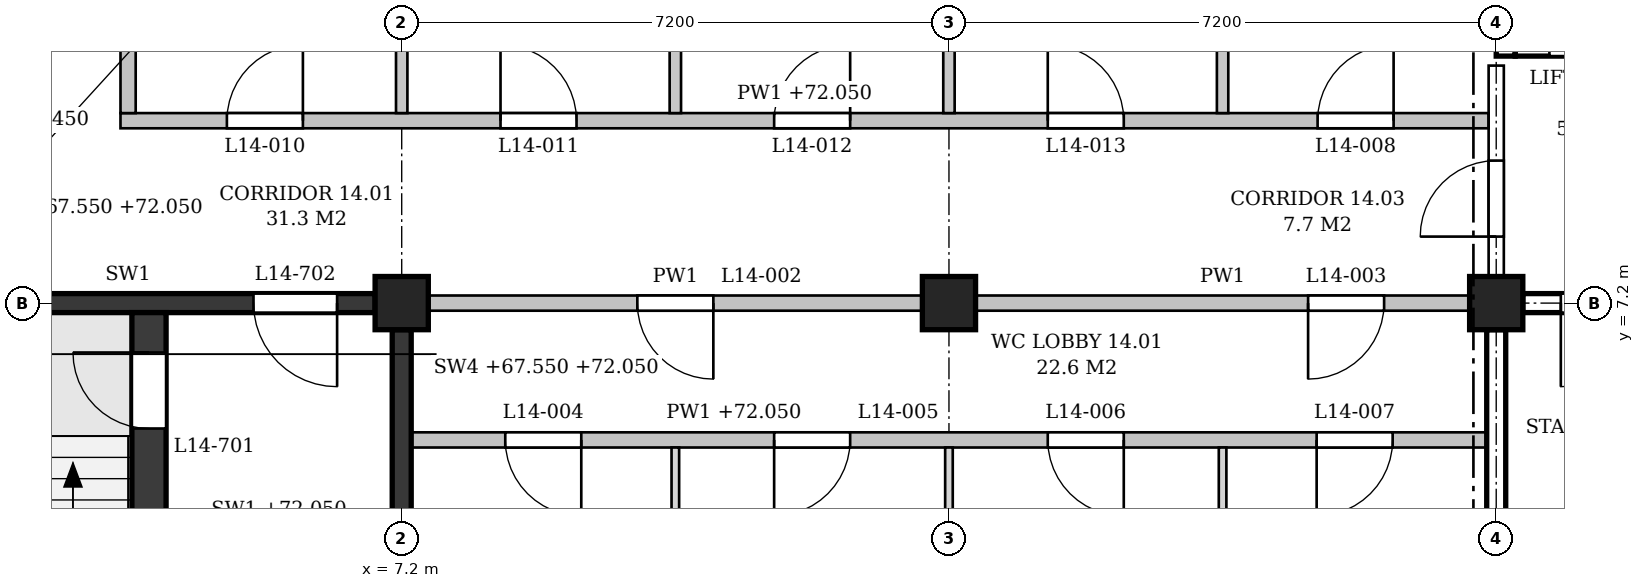
"""IFC4 building model, lengths in metres.
Left out: names, types, materials, properties, quantities, classifications, styles, units other than length and angle.
Written with IfcOpenShell. Run it as: python <this file> out.ifc"""

import sys

from ifc_helpers import new_model, si_unit, direction, frame, frame_2d, origin, origin_2d, place, context, subcontext, project, spatial, polyline, rectangle, outline, extrude, element, fill, save


model = new_model("IFC4")
c1 = context("Model", 3, precision=1e-05, world=origin(), true_north=direction((0.0, 1.0)))
c2 = subcontext(c1, "Body", "Model", "MODEL_VIEW")
j1 = project(units=[si_unit("LENGTHUNIT", "METRE"), si_unit("PLANEANGLEUNIT", "RADIAN")], contexts=[c1])
p1 = place(None, origin())
s1 = spatial("IfcSite", under=j1, at=p1, CompositionType="ELEMENT")
p2 = place(p1, origin())
s2 = spatial("IfcBuilding", under=s1, at=p2, CompositionType="ELEMENT")
p3 = place(p2, frame((0.0, 0.0, 67.8)))
s3 = spatial("IfcBuildingStorey", under=s2, at=p3, CompositionType="ELEMENT", Elevation=67.8)
for number, where, z_axis, x_axis in (
    (1, (7.2, 7.2, 0.0), (0.0, 0.0, 1.0), (1.0, 0.0, 0.0)),
    (2, (14.4, 7.2, 0.0), (0.0, 0.0, 1.0), (1.0, 0.0, 0.0)),
    (3, (21.6, 7.2, 0.0), (0.0, 0.0, 1.0), (1.0, 0.0, 0.0)),
):
    element("IfcColumn", number, at=place(p3, frame(where, z_axis=z_axis, x_axis=x_axis)), inside=s3, PredefinedType="COLUMN", context=c2, shape_type="SweptSolid", body=[
        extrude(rectangle(XDim=0.7, YDim=0.7, at=origin_2d()), origin(), (0.0, 0.0, 1.0), 4.5),
    ])
p4 = place(p3, frame((0.35, 7.2, 0.0), z_axis=(0.0, 0.0, 1.0), x_axis=(1.0, 0.0, 0.0)))
e4 = element("IfcWall", 4, at=p4, inside=s3, PredefinedType="SHEAR", context=c2, shape_type="SweptSolid", body=[
    extrude(rectangle(XDim=6.5, YDim=0.25, at=frame_2d((3.25, 0.0))), origin(), (0.0, 0.0, 1.0), 3.6),
])
p5 = place(p4, frame((4.9, 0.0, 0.0)))
e5 = element("IfcOpeningElement", 5, at=p5, cuts=e4, PredefinedType="OPENING", context=c2, shape_type="SweptSolid", body=[
    extrude(rectangle(XDim=1.1, YDim=2.1, at=frame_2d((0.55, 1.05))), frame((0.0, 0.135, 0.0), z_axis=(0.0, -1.0, 0.0), x_axis=(1.0, 0.0, 0.0)), (0.0, 0.0, 1.0), 0.27),
])
p6 = place(p3, frame((7.2, 0.35, 0.0), z_axis=(0.0, 0.0, 1.0), x_axis=(0.0, 1.0, 0.0)))
e6 = element("IfcWall", 6, at=p6, inside=s3, PredefinedType="SHEAR", context=c2, shape_type="SweptSolid", body=[
    extrude(rectangle(XDim=6.5, YDim=0.25, at=frame_2d((3.25, 0.0))), origin(), (0.0, 0.0, 1.0), 3.6),
])
p7 = place(p3, frame((3.875, 0.15, 0.0), z_axis=(0.0, 0.0, 1.0), x_axis=(0.0, 1.0, 0.0)))
e7 = element("IfcWall", 7, at=p7, inside=s3, PredefinedType="SHEAR", context=c2, shape_type="SweptSolid", body=[
    extrude(rectangle(XDim=6.925, YDim=0.45, at=frame_2d((3.462, 0.0))), origin(), (0.0, 0.0, 1.0), 4.25),
])
p8 = place(p7, frame((5.4, 0.0, 0.0)))
e8 = element("IfcOpeningElement", 8, at=p8, cuts=e7, PredefinedType="OPENING", context=c2, shape_type="SweptSolid", body=[
    extrude(rectangle(XDim=1.0, YDim=2.1, at=frame_2d((0.5, 1.05))), frame((0.0, 0.235, 0.0), z_axis=(0.0, -1.0, 0.0), x_axis=(1.0, 0.0, 0.0)), (0.0, 0.0, 1.0), 0.47),
])
p9 = place(p3, frame((21.95, 7.2, 0.0), z_axis=(0.0, 0.0, 1.0), x_axis=(1.0, 0.0, 0.0)))
e9 = element("IfcWall", 9, at=p9, inside=s3, PredefinedType="SHEAR", context=c2, shape_type="SweptSolid", body=[
    extrude(rectangle(XDim=6.5, YDim=0.25, at=frame_2d((3.25, 0.0))), origin(), (0.0, 0.0, 1.0), 3.6),
])
p10 = place(p9, frame((0.5, 0.0, 0.0)))
e10 = element("IfcOpeningElement", 10, at=p10, cuts=e9, PredefinedType="OPENING", context=c2, shape_type="SweptSolid", body=[
    extrude(rectangle(XDim=1.1, YDim=2.1, at=frame_2d((0.55, 1.05))), frame((0.0, 0.135, 0.0), z_axis=(0.0, -1.0, 0.0), x_axis=(1.0, 0.0, 0.0)), (0.0, 0.0, 1.0), 0.27),
])
p11 = place(p3, frame((21.6, 0.35, 0.0), z_axis=(0.0, 0.0, 1.0), x_axis=(0.0, 1.0, 0.0)))
e11 = element("IfcWall", 11, at=p11, inside=s3, PredefinedType="SHEAR", context=c2, shape_type="SweptSolid", body=[
    extrude(rectangle(XDim=6.5, YDim=0.25, at=frame_2d((3.25, 0.0))), origin(), (0.0, 0.0, 1.0), 3.6),
])
p12 = place(p3, frame((21.725, 10.45, -0.25), z_axis=(0.0, 0.0, 1.0), x_axis=(0.0, 1.0, 0.0)))
e12 = element("IfcWall", 12, at=p12, inside=s3, PredefinedType="SHEAR", context=c2, shape_type="SweptSolid", body=[
    extrude(rectangle(XDim=3.6, YDim=0.25, at=frame_2d((1.8, 0.0))), origin(), (0.0, 0.0, 1.0), 3.85),
])
p13 = place(p3, frame((21.85, 10.575, -0.25), z_axis=(0.0, 0.0, 1.0), x_axis=(1.0, 0.0, 0.0)))
e13 = element("IfcWall", 13, at=p13, inside=s3, PredefinedType="SHEAR", context=c2, shape_type="SweptSolid", body=[
    extrude(rectangle(XDim=2.0, YDim=0.25, at=frame_2d((1.0, 0.0))), origin(), (0.0, 0.0, 1.0), 4.5),
])
p14 = place(p13, frame((0.45, 0.0, 0.25)))
e14 = element("IfcOpeningElement", 14, at=p14, cuts=e13, PredefinedType="OPENING", context=c2, shape_type="SweptSolid", body=[
    extrude(rectangle(XDim=1.1, YDim=2.1, at=frame_2d((0.55, 1.05))), frame((0.0, 0.135, 0.0), z_axis=(0.0, -1.0, 0.0), x_axis=(1.0, 0.0, 0.0)), (0.0, 0.0, 1.0), 0.27),
])
p15 = place(p3, frame((7.325, 5.4, 0.0), z_axis=(0.0, 0.0, 1.0), x_axis=(1.0, 0.0, 0.0)))
e15 = element("IfcWall", 15, at=p15, inside=s3, PredefinedType="PARTITIONING", context=c2, shape_type="SweptSolid", body=[
    extrude(outline(polyline([(0.0, 0.0), (14.15, 0.0), (14.15, 3.6), (14.075, 3.6), (14.075, 4.25), (7.275, 4.25), (7.275, 3.6), (6.875, 3.6), (6.875, 4.25), (0.075, 4.25), (0.075, 3.6), (0.0, 3.6), (0.0, 0.0)])), frame((0.0, 0.1, 0.0), z_axis=(0.0, -1.0, 0.0), x_axis=(1.0, 0.0, 0.0)), (0.0, 0.0, 1.0), 0.2),
])
p16 = place(p15, frame((1.238, 0.0, 0.0)))
e16 = element("IfcOpeningElement", 16, at=p16, cuts=e15, PredefinedType="OPENING", context=c2, shape_type="SweptSolid", body=[
    extrude(rectangle(XDim=1.0, YDim=2.1, at=frame_2d((0.5, 1.05))), frame((0.0, 0.11, 0.0), z_axis=(0.0, -1.0, 0.0), x_axis=(1.0, 0.0, 0.0)), (0.0, 0.0, 1.0), 0.22),
])
p17 = place(p15, frame((4.775, 0.0, 0.0)))
e17 = element("IfcOpeningElement", 17, at=p17, cuts=e15, PredefinedType="OPENING", context=c2, shape_type="SweptSolid", body=[
    extrude(rectangle(XDim=1.0, YDim=2.1, at=frame_2d((0.5, 1.05))), frame((0.0, 0.11, 0.0), z_axis=(0.0, -1.0, 0.0), x_axis=(1.0, 0.0, 0.0)), (0.0, 0.0, 1.0), 0.22),
])
p18 = place(p15, frame((8.375, 0.0, 0.0)))
e18 = element("IfcOpeningElement", 18, at=p18, cuts=e15, PredefinedType="OPENING", context=c2, shape_type="SweptSolid", body=[
    extrude(rectangle(XDim=1.0, YDim=2.1, at=frame_2d((0.5, 1.05))), frame((0.0, 0.11, 0.0), z_axis=(0.0, -1.0, 0.0), x_axis=(1.0, 0.0, 0.0)), (0.0, 0.0, 1.0), 0.22),
])
p19 = place(p15, frame((11.913, 0.0, 0.0)))
e19 = element("IfcOpeningElement", 19, at=p19, cuts=e15, PredefinedType="OPENING", context=c2, shape_type="SweptSolid", body=[
    extrude(rectangle(XDim=1.0, YDim=2.1, at=frame_2d((0.5, 1.05))), frame((0.0, 0.11, 0.0), z_axis=(0.0, -1.0, 0.0), x_axis=(1.0, 0.0, 0.0)), (0.0, 0.0, 1.0), 0.22),
])
p20 = place(p3, frame((7.55, 7.2, 0.0), z_axis=(0.0, 0.0, 1.0), x_axis=(1.0, 0.0, 0.0)))
e20 = element("IfcWall", 20, at=p20, inside=s3, PredefinedType="PARTITIONING", context=c2, shape_type="SweptSolid", body=[
    extrude(rectangle(XDim=6.5, YDim=0.2, at=frame_2d((3.25, 0.0))), origin(), (0.0, 0.0, 1.0), 3.6),
])
p21 = place(p20, frame((2.75, 0.0, 0.0)))
e21 = element("IfcOpeningElement", 21, at=p21, cuts=e20, PredefinedType="OPENING", context=c2, shape_type="SweptSolid", body=[
    extrude(rectangle(XDim=1.0, YDim=2.1, at=frame_2d((0.5, 1.05))), frame((0.0, 0.11, 0.0), z_axis=(0.0, -1.0, 0.0), x_axis=(1.0, 0.0, 0.0)), (0.0, 0.0, 1.0), 0.22),
])
p22 = place(p3, frame((14.75, 7.2, 0.0), z_axis=(0.0, 0.0, 1.0), x_axis=(1.0, 0.0, 0.0)))
e22 = element("IfcWall", 22, at=p22, inside=s3, PredefinedType="PARTITIONING", context=c2, shape_type="SweptSolid", body=[
    extrude(rectangle(XDim=6.5, YDim=0.2, at=frame_2d((3.25, 0.0))), origin(), (0.0, 0.0, 1.0), 3.6),
])
p23 = place(p22, frame((4.375, 0.0, 0.0)))
e23 = element("IfcOpeningElement", 23, at=p23, cuts=e22, PredefinedType="OPENING", context=c2, shape_type="SweptSolid", body=[
    extrude(rectangle(XDim=1.0, YDim=2.1, at=frame_2d((0.5, 1.05))), frame((0.0, 0.11, 0.0), z_axis=(0.0, -1.0, 0.0), x_axis=(1.0, 0.0, 0.0)), (0.0, 0.0, 1.0), 0.22),
])
p24 = place(p3, frame((3.5, 9.6, 0.0), z_axis=(0.0, 0.0, 1.0), x_axis=(1.0, 0.0, 0.0)))
e24 = element("IfcWall", 24, at=p24, inside=s3, PredefinedType="PARTITIONING", context=c2, shape_type="SweptSolid", body=[
    extrude(outline(polyline([(0.0, 0.0), (18.0, 0.0), (18.0, 3.6), (17.9, 3.6), (17.9, 4.25), (11.1, 4.25), (11.1, 3.6), (10.7, 3.6), (10.7, 4.25), (3.9, 4.25), (3.9, 3.6), (3.5, 3.6), (3.5, 4.25), (0.0, 4.25), (0.0, 0.0)])), frame((0.0, 0.1, 0.0), z_axis=(0.0, -1.0, 0.0), x_axis=(1.0, 0.0, 0.0)), (0.0, 0.0, 1.0), 0.2),
])
p25 = place(p24, frame((15.75, 0.0, 0.0)))
e25 = element("IfcOpeningElement", 25, at=p25, cuts=e24, PredefinedType="OPENING", context=c2, shape_type="SweptSolid", body=[
    extrude(rectangle(XDim=1.0, YDim=2.1, at=frame_2d((0.5, 1.05))), frame((0.0, 0.11, 0.0), z_axis=(0.0, -1.0, 0.0), x_axis=(1.0, 0.0, 0.0)), (0.0, 0.0, 1.0), 0.22),
])
p26 = place(p24, frame((1.4, 0.0, 0.0)))
e26 = element("IfcOpeningElement", 26, at=p26, cuts=e24, PredefinedType="OPENING", context=c2, shape_type="SweptSolid", body=[
    extrude(rectangle(XDim=1.0, YDim=2.1, at=frame_2d((0.5, 1.05))), frame((0.0, 0.11, 0.0), z_axis=(0.0, -1.0, 0.0), x_axis=(1.0, 0.0, 0.0)), (0.0, 0.0, 1.0), 0.22),
])
p27 = place(p24, frame((5.0, 0.0, 0.0)))
e27 = element("IfcOpeningElement", 27, at=p27, cuts=e24, PredefinedType="OPENING", context=c2, shape_type="SweptSolid", body=[
    extrude(rectangle(XDim=1.0, YDim=2.1, at=frame_2d((0.5, 1.05))), frame((0.0, 0.11, 0.0), z_axis=(0.0, -1.0, 0.0), x_axis=(1.0, 0.0, 0.0)), (0.0, 0.0, 1.0), 0.22),
])
p28 = place(p24, frame((8.6, 0.0, 0.0)))
e28 = element("IfcOpeningElement", 28, at=p28, cuts=e24, PredefinedType="OPENING", context=c2, shape_type="SweptSolid", body=[
    extrude(rectangle(XDim=1.0, YDim=2.1, at=frame_2d((0.5, 1.05))), frame((0.0, 0.11, 0.0), z_axis=(0.0, -1.0, 0.0), x_axis=(1.0, 0.0, 0.0)), (0.0, 0.0, 1.0), 0.22),
])
p29 = place(p24, frame((12.2, 0.0, 0.0)))
e29 = element("IfcOpeningElement", 29, at=p29, cuts=e24, PredefinedType="OPENING", context=c2, shape_type="SweptSolid", body=[
    extrude(rectangle(XDim=1.0, YDim=2.1, at=frame_2d((0.5, 1.05))), frame((0.0, 0.11, 0.0), z_axis=(0.0, -1.0, 0.0), x_axis=(1.0, 0.0, 0.0)), (0.0, 0.0, 1.0), 0.22),
])
p30 = place(p3, frame((3.6, 9.7, 0.0), z_axis=(0.0, 0.0, 1.0), x_axis=(0.0, 1.0, 0.0)))
e30 = element("IfcWall", 30, at=p30, inside=s3, PredefinedType="PARTITIONING", context=c2, shape_type="SweptSolid", body=[
    extrude(rectangle(XDim=1.1, YDim=0.2, at=frame_2d((0.55, 0.0))), origin(), (0.0, 0.0, 1.0), 4.25),
])
p31 = place(p3, frame((7.2, 9.7, 0.0), z_axis=(0.0, 0.0, 1.0), x_axis=(0.0, 1.0, 0.0)))
e31 = element("IfcWall", 31, at=p31, inside=s3, PredefinedType="PARTITIONING", context=c2, shape_type="SweptSolid", body=[
    extrude(rectangle(XDim=4.35, YDim=0.15, at=frame_2d((2.175, 0.0))), origin(), (0.0, 0.0, 1.0), 3.6),
])
p32 = place(p3, frame((10.8, 0.15, 0.0), z_axis=(0.0, 0.0, 1.0), x_axis=(0.0, 1.0, 0.0)))
e32 = element("IfcWall", 32, at=p32, inside=s3, PredefinedType="PARTITIONING", context=c2, shape_type="SweptSolid", body=[
    extrude(rectangle(XDim=5.15, YDim=0.1, at=frame_2d((2.575, 0.0))), origin(), (0.0, 0.0, 1.0), 3.6),
])
p33 = place(p3, frame((10.8, 9.7, 0.0), z_axis=(0.0, 0.0, 1.0), x_axis=(0.0, 1.0, 0.0)))
e33 = element("IfcWall", 33, at=p33, inside=s3, PredefinedType="PARTITIONING", context=c2, shape_type="SweptSolid", body=[
    extrude(rectangle(XDim=4.55, YDim=0.15, at=frame_2d((2.275, 0.0))), origin(), (0.0, 0.0, 1.0), 3.6),
])
p34 = place(p3, frame((14.4, 0.35, 0.0), z_axis=(0.0, 0.0, 1.0), x_axis=(0.0, 1.0, 0.0)))
e34 = element("IfcWall", 34, at=p34, inside=s3, PredefinedType="PARTITIONING", context=c2, shape_type="SweptSolid", body=[
    extrude(rectangle(XDim=4.95, YDim=0.1, at=frame_2d((2.475, 0.0))), origin(), (0.0, 0.0, 1.0), 3.6),
])
p35 = place(p3, frame((14.4, 9.7, 0.0), z_axis=(0.0, 0.0, 1.0), x_axis=(0.0, 1.0, 0.0)))
e35 = element("IfcWall", 35, at=p35, inside=s3, PredefinedType="PARTITIONING", context=c2, shape_type="SweptSolid", body=[
    extrude(rectangle(XDim=4.35, YDim=0.15, at=frame_2d((2.175, 0.0))), origin(), (0.0, 0.0, 1.0), 3.6),
])
p36 = place(p3, frame((18.0, 0.15, 0.0), z_axis=(0.0, 0.0, 1.0), x_axis=(0.0, 1.0, 0.0)))
e36 = element("IfcWall", 36, at=p36, inside=s3, PredefinedType="PARTITIONING", context=c2, shape_type="SweptSolid", body=[
    extrude(rectangle(XDim=5.15, YDim=0.1, at=frame_2d((2.575, 0.0))), origin(), (0.0, 0.0, 1.0), 3.6),
])
p37 = place(p3, frame((18.0, 9.7, 0.0), z_axis=(0.0, 0.0, 1.0), x_axis=(0.0, 1.0, 0.0)))
e37 = element("IfcWall", 37, at=p37, inside=s3, PredefinedType="PARTITIONING", context=c2, shape_type="SweptSolid", body=[
    extrude(rectangle(XDim=4.55, YDim=0.15, at=frame_2d((2.275, 0.0))), origin(), (0.0, 0.0, 1.0), 3.6),
])
p38 = place(p3, frame((21.6, 7.55, 0.0), z_axis=(0.0, 0.0, 1.0), x_axis=(0.0, 1.0, 0.0)))
e38 = element("IfcWall", 38, at=p38, inside=s3, PredefinedType="PARTITIONING", context=c2, shape_type="SweptSolid", body=[
    extrude(rectangle(XDim=2.775, YDim=0.2, at=frame_2d((1.387, 0.0))), origin(), (0.0, 0.0, 1.0), 3.6),
])
p39 = place(p38, frame((0.525, 0.0, 0.0)))
e39 = element("IfcOpeningElement", 39, at=p39, cuts=e38, PredefinedType="OPENING", context=c2, shape_type="SweptSolid", body=[
    extrude(rectangle(XDim=1.0, YDim=2.1, at=frame_2d((0.5, 1.05))), frame((0.0, 0.11, 0.0), z_axis=(0.0, -1.0, 0.0), x_axis=(1.0, 0.0, 0.0)), (0.0, 0.0, 1.0), 0.22),
])
p40 = place(p8, origin())
e40 = element("IfcDoor", 40, at=p40, inside=s3, OperationType="SINGLE_SWING_RIGHT", PredefinedType="DOOR", context=c2, shape_type="SweptSolid", body=[
    extrude(rectangle(XDim=1.0, YDim=2.1, at=frame_2d((0.5, 1.05))), frame((0.0, 0.025, 0.0), z_axis=(0.0, -1.0, 0.0), x_axis=(1.0, 0.0, 0.0)), (0.0, 0.0, 1.0), 0.05),
])
fill(e8, e40)
p41 = place(p5, frame((1.1, 0.0, 0.0), z_axis=(0.0, 0.0, 1.0), x_axis=(-1.0, 0.0, 0.0)))
e41 = element("IfcDoor", 41, at=p41, inside=s3, OperationType="SINGLE_SWING_LEFT", PredefinedType="DOOR", context=c2, shape_type="SweptSolid", body=[
    extrude(rectangle(XDim=1.1, YDim=2.1, at=frame_2d((0.55, 1.05))), frame((0.0, 0.025, 0.0), z_axis=(0.0, -1.0, 0.0), x_axis=(1.0, 0.0, 0.0)), (0.0, 0.0, 1.0), 0.05),
])
fill(e5, e41)
p42 = place(p10, frame((1.1, 0.0, 0.0), z_axis=(0.0, 0.0, 1.0), x_axis=(-1.0, 0.0, 0.0)))
e42 = element("IfcDoor", 42, at=p42, inside=s3, OperationType="SINGLE_SWING_RIGHT", PredefinedType="DOOR", context=c2, shape_type="SweptSolid", body=[
    extrude(rectangle(XDim=1.1, YDim=2.1, at=frame_2d((0.55, 1.05))), frame((0.0, 0.025, 0.0), z_axis=(0.0, -1.0, 0.0), x_axis=(1.0, 0.0, 0.0)), (0.0, 0.0, 1.0), 0.05),
])
fill(e10, e42)
p43 = place(p39, origin())
e43 = element("IfcDoor", 43, at=p43, inside=s3, OperationType="SINGLE_SWING_LEFT", PredefinedType="DOOR", context=c2, shape_type="SweptSolid", body=[
    extrude(rectangle(XDim=1.0, YDim=2.1, at=frame_2d((0.5, 1.05))), frame((0.0, 0.025, 0.0), z_axis=(0.0, -1.0, 0.0), x_axis=(1.0, 0.0, 0.0)), (0.0, 0.0, 1.0), 0.05),
])
fill(e39, e43)
p44 = place(p21, frame((1.0, 0.0, 0.0), z_axis=(0.0, 0.0, 1.0), x_axis=(-1.0, 0.0, 0.0)))
e44 = element("IfcDoor", 44, at=p44, inside=s3, OperationType="SINGLE_SWING_LEFT", PredefinedType="DOOR", context=c2, shape_type="SweptSolid", body=[
    extrude(rectangle(XDim=1.0, YDim=2.1, at=frame_2d((0.5, 1.05))), frame((0.0, 0.025, 0.0), z_axis=(0.0, -1.0, 0.0), x_axis=(1.0, 0.0, 0.0)), (0.0, 0.0, 1.0), 0.05),
])
fill(e21, e44)
p45 = place(p23, frame((1.0, 0.0, 0.0), z_axis=(0.0, 0.0, 1.0), x_axis=(-1.0, 0.0, 0.0)))
e45 = element("IfcDoor", 45, at=p45, inside=s3, OperationType="SINGLE_SWING_RIGHT", PredefinedType="DOOR", context=c2, shape_type="SweptSolid", body=[
    extrude(rectangle(XDim=1.0, YDim=2.1, at=frame_2d((0.5, 1.05))), frame((0.0, 0.025, 0.0), z_axis=(0.0, -1.0, 0.0), x_axis=(1.0, 0.0, 0.0)), (0.0, 0.0, 1.0), 0.05),
])
fill(e23, e45)
p46 = place(p16, frame((1.0, 0.0, 0.0), z_axis=(0.0, 0.0, 1.0), x_axis=(-1.0, 0.0, 0.0)))
e46 = element("IfcDoor", 46, at=p46, inside=s3, OperationType="SINGLE_SWING_LEFT", PredefinedType="DOOR", context=c2, shape_type="SweptSolid", body=[
    extrude(rectangle(XDim=1.0, YDim=2.1, at=frame_2d((0.5, 1.05))), frame((0.0, 0.025, 0.0), z_axis=(0.0, -1.0, 0.0), x_axis=(1.0, 0.0, 0.0)), (0.0, 0.0, 1.0), 0.05),
])
fill(e16, e46)
p47 = place(p17, frame((1.0, 0.0, 0.0), z_axis=(0.0, 0.0, 1.0), x_axis=(-1.0, 0.0, 0.0)))
e47 = element("IfcDoor", 47, at=p47, inside=s3, OperationType="SINGLE_SWING_RIGHT", PredefinedType="DOOR", context=c2, shape_type="SweptSolid", body=[
    extrude(rectangle(XDim=1.0, YDim=2.1, at=frame_2d((0.5, 1.05))), frame((0.0, 0.025, 0.0), z_axis=(0.0, -1.0, 0.0), x_axis=(1.0, 0.0, 0.0)), (0.0, 0.0, 1.0), 0.05),
])
fill(e17, e47)
p48 = place(p18, frame((1.0, 0.0, 0.0), z_axis=(0.0, 0.0, 1.0), x_axis=(-1.0, 0.0, 0.0)))
e48 = element("IfcDoor", 48, at=p48, inside=s3, OperationType="SINGLE_SWING_LEFT", PredefinedType="DOOR", context=c2, shape_type="SweptSolid", body=[
    extrude(rectangle(XDim=1.0, YDim=2.1, at=frame_2d((0.5, 1.05))), frame((0.0, 0.025, 0.0), z_axis=(0.0, -1.0, 0.0), x_axis=(1.0, 0.0, 0.0)), (0.0, 0.0, 1.0), 0.05),
])
fill(e18, e48)
p49 = place(p19, frame((1.0, 0.0, 0.0), z_axis=(0.0, 0.0, 1.0), x_axis=(-1.0, 0.0, 0.0)))
e49 = element("IfcDoor", 49, at=p49, inside=s3, OperationType="SINGLE_SWING_RIGHT", PredefinedType="DOOR", context=c2, shape_type="SweptSolid", body=[
    extrude(rectangle(XDim=1.0, YDim=2.1, at=frame_2d((0.5, 1.05))), frame((0.0, 0.025, 0.0), z_axis=(0.0, -1.0, 0.0), x_axis=(1.0, 0.0, 0.0)), (0.0, 0.0, 1.0), 0.05),
])
fill(e19, e49)
p50 = place(p25, origin())
e50 = element("IfcDoor", 50, at=p50, inside=s3, OperationType="SINGLE_SWING_RIGHT", PredefinedType="DOOR", context=c2, shape_type="SweptSolid", body=[
    extrude(rectangle(XDim=1.0, YDim=2.1, at=frame_2d((0.5, 1.05))), frame((0.0, 0.025, 0.0), z_axis=(0.0, -1.0, 0.0), x_axis=(1.0, 0.0, 0.0)), (0.0, 0.0, 1.0), 0.05),
])
fill(e25, e50)
p51 = place(p26, origin())
e51 = element("IfcDoor", 51, at=p51, inside=s3, OperationType="SINGLE_SWING_RIGHT", PredefinedType="DOOR", context=c2, shape_type="SweptSolid", body=[
    extrude(rectangle(XDim=1.0, YDim=2.1, at=frame_2d((0.5, 1.05))), frame((0.0, 0.025, 0.0), z_axis=(0.0, -1.0, 0.0), x_axis=(1.0, 0.0, 0.0)), (0.0, 0.0, 1.0), 0.05),
])
fill(e26, e51)
p52 = place(p27, origin())
e52 = element("IfcDoor", 52, at=p52, inside=s3, OperationType="SINGLE_SWING_LEFT", PredefinedType="DOOR", context=c2, shape_type="SweptSolid", body=[
    extrude(rectangle(XDim=1.0, YDim=2.1, at=frame_2d((0.5, 1.05))), frame((0.0, 0.025, 0.0), z_axis=(0.0, -1.0, 0.0), x_axis=(1.0, 0.0, 0.0)), (0.0, 0.0, 1.0), 0.05),
])
fill(e27, e52)
p53 = place(p28, origin())
e53 = element("IfcDoor", 53, at=p53, inside=s3, OperationType="SINGLE_SWING_RIGHT", PredefinedType="DOOR", context=c2, shape_type="SweptSolid", body=[
    extrude(rectangle(XDim=1.0, YDim=2.1, at=frame_2d((0.5, 1.05))), frame((0.0, 0.025, 0.0), z_axis=(0.0, -1.0, 0.0), x_axis=(1.0, 0.0, 0.0)), (0.0, 0.0, 1.0), 0.05),
])
fill(e28, e53)
p54 = place(p29, origin())
e54 = element("IfcDoor", 54, at=p54, inside=s3, OperationType="SINGLE_SWING_LEFT", PredefinedType="DOOR", context=c2, shape_type="SweptSolid", body=[
    extrude(rectangle(XDim=1.0, YDim=2.1, at=frame_2d((0.5, 1.05))), frame((0.0, 0.025, 0.0), z_axis=(0.0, -1.0, 0.0), x_axis=(1.0, 0.0, 0.0)), (0.0, 0.0, 1.0), 0.05),
])
fill(e29, e54)
save(model, sys.argv[1])
